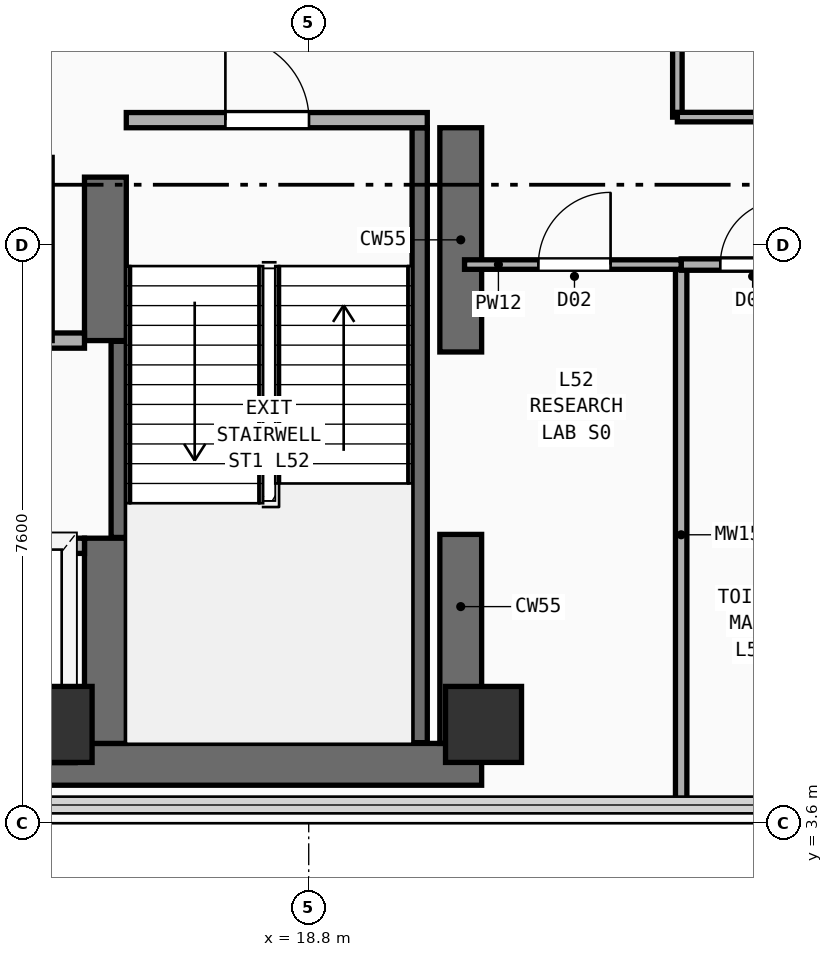
"""IFC4 building model, lengths in metres.
Left out: names, types, materials, properties, quantities, classifications, styles, units other than length and angle.
Written with IfcOpenShell. Run it as: python <this file> out.ifc"""

import sys

from ifc_helpers import new_model, si_unit, direction, frame, frame_2d, origin, origin_2d, place, context, subcontext, project, spatial, rectangle, extrude, element, fill, save


model = new_model("IFC4")
c1 = context("Model", 3, precision=1e-05, world=origin(), true_north=direction((0.0, 1.0)))
c2 = subcontext(c1, "Body", "Model", "MODEL_VIEW")
j1 = project(units=[si_unit("LENGTHUNIT", "METRE"), si_unit("PLANEANGLEUNIT", "RADIAN")], contexts=[c1])
p1 = place(None, origin())
s1 = spatial("IfcSite", under=j1, at=p1, CompositionType="ELEMENT")
p2 = place(p1, origin())
s2 = spatial("IfcBuilding", under=s1, at=p2, CompositionType="ELEMENT")
p3 = place(p2, frame((0.0, 0.0, 204.5)))
s3 = spatial("IfcBuildingStorey", under=s2, at=p3, CompositionType="ELEMENT", Elevation=204.5)
p4 = place(p3, frame((7.175, 4.375, 0.0), z_axis=(0.0, 0.0, 1.0), x_axis=(1.0, 0.0, 0.0)))
e1 = element("IfcWall", 1, at=p4, inside=s3, PredefinedType="SHEAR", context=c2, shape_type="SweptSolid", body=[
    extrude(rectangle(XDim=13.9, YDim=0.55, at=frame_2d((6.95, 0.0))), origin(), (0.0, 0.0, 1.0), 3.56),
])
p5 = place(p3, frame((20.8, 4.65, 0.0), z_axis=(0.0, 0.0, 1.0), x_axis=(0.0, 1.0, 0.0)))
e2 = element("IfcWall", 2, at=p5, inside=s3, PredefinedType="SHEAR", context=c2, shape_type="SweptSolid", body=[
    extrude(rectangle(XDim=2.75, YDim=0.55, at=frame_2d((1.375, 0.0))), origin(), (0.0, 0.0, 1.0), 3.56),
])
p6 = place(p3, frame((20.8, 9.8, 0.0), z_axis=(0.0, 0.0, 1.0), x_axis=(0.0, 1.0, 0.0)))
e3 = element("IfcWall", 3, at=p6, inside=s3, PredefinedType="SHEAR", context=c2, shape_type="SweptSolid", body=[
    extrude(rectangle(XDim=2.95, YDim=0.55, at=frame_2d((1.475, 0.0))), origin(), (0.0, 0.0, 1.0), 3.56),
])
p7 = place(p3, frame((16.125, 4.65, 0.0), z_axis=(0.0, 0.0, 1.0), x_axis=(0.0, 1.0, 0.0)))
e4 = element("IfcWall", 4, at=p7, inside=s3, PredefinedType="SHEAR", context=c2, shape_type="SweptSolid", body=[
    extrude(rectangle(XDim=2.7, YDim=0.55, at=frame_2d((1.35, 0.0))), origin(), (0.0, 0.0, 1.0), 3.56),
])
p8 = place(p3, frame((16.125, 9.95, 0.0), z_axis=(0.0, 0.0, 1.0), x_axis=(0.0, 1.0, 0.0)))
e5 = element("IfcWall", 5, at=p8, inside=s3, PredefinedType="SHEAR", context=c2, shape_type="SweptSolid", body=[
    extrude(rectangle(XDim=2.15, YDim=0.55, at=frame_2d((1.075, 0.0))), origin(), (0.0, 0.0, 1.0), 3.56),
])
for number, where, z_axis, x_axis in (
    (6, (15.45, 4.9, 0.0), (0.0, 0.0, 1.0), (1.0, 0.0, 0.0)),
    (7, (21.1, 4.9, 0.0), (0.0, 0.0, 1.0), (1.0, 0.0, 0.0)),
):
    element("IfcColumn", number, at=place(p3, frame(where, z_axis=z_axis, x_axis=x_axis)), inside=s3, PredefinedType="COLUMN", context=c2, shape_type="SweptSolid", body=[
        extrude(rectangle(XDim=1.0, YDim=1.0, at=origin_2d()), origin(), (0.0, 0.0, 1.0), 3.56),
    ])
p9 = place(p3, frame((16.3, 7.36, 0.0), z_axis=(0.0, 0.0, 1.0), x_axis=(0.0, 1.0, 0.0)))
e8 = element("IfcWall", 8, at=p9, inside=s3, PredefinedType="SHEAR", context=c2, shape_type="SweptSolid", body=[
    extrude(rectangle(XDim=2.58, YDim=0.2, at=frame_2d((1.29, 0.0))), origin(), (0.0, 0.0, 1.0), 3.56),
])
p10 = place(p3, frame((20.26, 4.66, 0.0), z_axis=(0.0, 0.0, 1.0), x_axis=(0.0, 1.0, 0.0)))
e9 = element("IfcWall", 9, at=p10, inside=s3, PredefinedType="SHEAR", context=c2, shape_type="SweptSolid", body=[
    extrude(rectangle(XDim=8.09, YDim=0.2, at=frame_2d((4.045, 0.0))), origin(), (0.0, 0.0, 1.0), 3.56),
])
p11 = place(p3, frame((16.4, 12.85, 0.0), z_axis=(0.0, 0.0, 1.0), x_axis=(1.0, 0.0, 0.0)))
e10 = element("IfcWall", 10, at=p11, inside=s3, PredefinedType="PARTITIONING", context=c2, shape_type="SweptSolid", body=[
    extrude(rectangle(XDim=3.96, YDim=0.2, at=frame_2d((1.98, 0.0))), origin(), (0.0, 0.0, 1.0), 3.56),
])
p12 = place(p11, frame((1.304, 0.0, 0.0)))
e11 = element("IfcOpeningElement", 11, at=p12, cuts=e10, PredefinedType="OPENING", context=c2, shape_type="SweptSolid", body=[
    extrude(rectangle(XDim=1.1, YDim=2.2, at=frame_2d((0.55, 1.1))), frame((0.0, 0.11, 0.0), z_axis=(0.0, -1.0, 0.0), x_axis=(1.0, 0.0, 0.0)), (0.0, 0.0, 1.0), 0.22),
])
p13 = place(p3, frame((7.5, 7.25, 0.0), z_axis=(0.0, 0.0, 1.0), x_axis=(1.0, 0.0, 0.0)))
e12 = element("IfcWall", 12, at=p13, inside=s3, PredefinedType="PARTITIONING", context=c2, shape_type="SweptSolid", body=[
    extrude(rectangle(XDim=8.35, YDim=0.2, at=frame_2d((4.175, 0.0))), origin(), (0.0, 0.0, 1.0), 3.56),
])
p14 = place(p13, frame((0.53, 0.0, 0.0)))
e13 = element("IfcOpeningElement", 13, at=p14, cuts=e12, PredefinedType="OPENING", context=c2, shape_type="SweptSolid", body=[
    extrude(rectangle(XDim=1.1, YDim=2.2, at=frame_2d((0.55, 1.1))), frame((0.0, 0.11, 0.0), z_axis=(0.0, -1.0, 0.0), x_axis=(1.0, 0.0, 0.0)), (0.0, 0.0, 1.0), 0.22),
])
p15 = place(p13, frame((2.37, 0.0, 0.0)))
e14 = element("IfcOpeningElement", 14, at=p15, cuts=e12, PredefinedType="OPENING", context=c2, shape_type="SweptSolid", body=[
    extrude(rectangle(XDim=1.1, YDim=2.2, at=frame_2d((0.55, 1.1))), frame((0.0, 0.11, 0.0), z_axis=(0.0, -1.0, 0.0), x_axis=(1.0, 0.0, 0.0)), (0.0, 0.0, 1.0), 0.22),
])
p16 = place(p13, frame((4.33, 0.0, 0.0)))
e15 = element("IfcOpeningElement", 15, at=p16, cuts=e12, PredefinedType="OPENING", context=c2, shape_type="SweptSolid", body=[
    extrude(rectangle(XDim=1.1, YDim=2.2, at=frame_2d((0.55, 1.1))), frame((0.0, 0.11, 0.0), z_axis=(0.0, -1.0, 0.0), x_axis=(1.0, 0.0, 0.0)), (0.0, 0.0, 1.0), 0.22),
])
p17 = place(p13, frame((6.5, 0.0, 0.0)))
e16 = element("IfcOpeningElement", 16, at=p17, cuts=e12, PredefinedType="OPENING", context=c2, shape_type="SweptSolid", body=[
    extrude(rectangle(XDim=1.1, YDim=2.2, at=frame_2d((0.55, 1.1))), frame((0.0, 0.11, 0.0), z_axis=(0.0, -1.0, 0.0), x_axis=(1.0, 0.0, 0.0)), (0.0, 0.0, 1.0), 0.22),
])
p18 = place(p3, frame((7.5, 9.95, 0.0), z_axis=(0.0, 0.0, 1.0), x_axis=(1.0, 0.0, 0.0)))
e17 = element("IfcWall", 17, at=p18, inside=s3, PredefinedType="PARTITIONING", context=c2, shape_type="SweptSolid", body=[
    extrude(rectangle(XDim=8.35, YDim=0.2, at=frame_2d((4.175, 0.0))), origin(), (0.0, 0.0, 1.0), 3.56),
])
p19 = place(p3, frame((15.35, 9.95, 0.0), z_axis=(0.0, 0.0, 1.0), x_axis=(0.0, 1.0, 0.0)))
e18 = element("IfcWall", 18, at=p19, inside=s3, PredefinedType="PARTITIONING", context=c2, shape_type="SweptSolid", body=[
    extrude(rectangle(XDim=2.41, YDim=0.15, at=frame_2d((1.205, 0.0))), origin(), (0.0, 0.0, 1.0), 3.56),
])
p20 = place(p3, frame((23.7, 3.84, 0.0), z_axis=(0.0, 0.0, 1.0), x_axis=(0.0, 1.0, 0.0)))
e19 = element("IfcWall", 19, at=p20, inside=s3, PredefinedType="PLUMBINGWALL", context=c2, shape_type="SweptSolid", body=[
    extrude(rectangle(XDim=7.11, YDim=0.15, at=frame_2d((3.555, 0.0))), origin(), (0.0, 0.0, 1.0), 3.56),
])
p21 = place(p3, frame((23.7, 10.95, 0.0), z_axis=(0.0, 0.0, 1.0), x_axis=(1.0, 0.0, 0.0)))
e20 = element("IfcWall", 20, at=p21, inside=s3, PredefinedType="PLUMBINGWALL", context=c2, shape_type="SweptSolid", body=[
    extrude(rectangle(XDim=5.7, YDim=0.15, at=frame_2d((2.85, 0.0))), origin(), (0.0, 0.0, 1.0), 3.56),
])
p22 = place(p21, frame((0.515, 0.0, 0.0)))
e21 = element("IfcOpeningElement", 21, at=p22, cuts=e20, PredefinedType="OPENING", context=c2, shape_type="SweptSolid", body=[
    extrude(rectangle(XDim=0.85, YDim=2.15, at=frame_2d((0.425, 1.075))), frame((0.0, 0.085, 0.0), z_axis=(0.0, -1.0, 0.0), x_axis=(1.0, 0.0, 0.0)), (0.0, 0.0, 1.0), 0.17),
])
p23 = place(p21, frame((2.395, 0.0, 0.0)))
e22 = element("IfcOpeningElement", 22, at=p23, cuts=e20, PredefinedType="OPENING", context=c2, shape_type="SweptSolid", body=[
    extrude(rectangle(XDim=0.85, YDim=2.15, at=frame_2d((0.425, 1.075))), frame((0.0, 0.085, 0.0), z_axis=(0.0, -1.0, 0.0), x_axis=(1.0, 0.0, 0.0)), (0.0, 0.0, 1.0), 0.17),
])
p24 = place(p21, frame((4.35, 0.0, 0.0)))
e23 = element("IfcOpeningElement", 23, at=p24, cuts=e20, PredefinedType="OPENING", context=c2, shape_type="SweptSolid", body=[
    extrude(rectangle(XDim=1.0, YDim=2.2, at=frame_2d((0.5, 1.1))), frame((0.0, 0.085, 0.0), z_axis=(0.0, -1.0, 0.0), x_axis=(1.0, 0.0, 0.0)), (0.0, 0.0, 1.0), 0.17),
])
p25 = place(p3, frame((20.85, 10.95, 0.0), z_axis=(0.0, 0.0, 1.0), x_axis=(1.0, 0.0, 0.0)))
e24 = element("IfcWall", 24, at=p25, inside=s3, PredefinedType="PARTITIONING", context=c2, shape_type="SweptSolid", body=[
    extrude(rectangle(XDim=2.85, YDim=0.125, at=frame_2d((1.425, 0.0))), origin(), (0.0, 0.0, 1.0), 3.56),
])
p26 = place(p25, frame((0.971, 0.0, 0.0)))
e25 = element("IfcOpeningElement", 25, at=p26, cuts=e24, PredefinedType="OPENING", context=c2, shape_type="SweptSolid", body=[
    extrude(rectangle(XDim=0.95, YDim=2.15, at=frame_2d((0.475, 1.075))), frame((0.0, 0.073, 0.0), z_axis=(0.0, -1.0, 0.0), x_axis=(1.0, 0.0, 0.0)), (0.0, 0.0, 1.0), 0.145),
])
p27 = place(p3, frame((23.65, 12.89, 0.0), z_axis=(0.0, 0.0, 1.0), x_axis=(0.0, 1.0, 0.0)))
e26 = element("IfcWall", 26, at=p27, inside=s3, PredefinedType="PARTITIONING", context=c2, shape_type="SweptSolid", body=[
    extrude(rectangle(XDim=11.02, YDim=0.125, at=frame_2d((5.51, 0.0))), origin(), (0.0, 0.0, 1.0), 3.56),
])
p28 = place(p3, frame((23.65, 12.89, 0.0), z_axis=(0.0, 0.0, 1.0), x_axis=(1.0, 0.0, 0.0)))
e27 = element("IfcWall", 27, at=p28, inside=s3, PredefinedType="PARTITIONING", context=c2, shape_type="SweptSolid", body=[
    extrude(rectangle(XDim=10.55, YDim=0.125, at=frame_2d((5.275, 0.0))), origin(), (0.0, 0.0, 1.0), 3.56),
])
p29 = place(p28, frame((1.95, 0.0, 0.0)))
e28 = element("IfcOpeningElement", 28, at=p29, cuts=e27, PredefinedType="OPENING", context=c2, shape_type="SweptSolid", body=[
    extrude(rectangle(XDim=0.95, YDim=2.15, at=frame_2d((0.475, 1.075))), frame((0.0, 0.073, 0.0), z_axis=(0.0, -1.0, 0.0), x_axis=(1.0, 0.0, 0.0)), (0.0, 0.0, 1.0), 0.145),
])
p30 = place(p28, frame((7.225, 0.0, 0.0)))
e29 = element("IfcOpeningElement", 29, at=p30, cuts=e27, PredefinedType="OPENING", context=c2, shape_type="SweptSolid", body=[
    extrude(rectangle(XDim=0.95, YDim=2.15, at=frame_2d((0.475, 1.075))), frame((0.0, 0.073, 0.0), z_axis=(0.0, -1.0, 0.0), x_axis=(1.0, 0.0, 0.0)), (0.0, 0.0, 1.0), 0.145),
])
p31 = place(p12, frame((1.1, 0.0, 0.0), z_axis=(0.0, 0.0, 1.0), x_axis=(-1.0, 0.0, 0.0)))
e30 = element("IfcDoor", 30, at=p31, inside=s3, OperationType="SINGLE_SWING_RIGHT", PredefinedType="DOOR", context=c2, shape_type="SweptSolid", body=[
    extrude(rectangle(XDim=1.1, YDim=2.2, at=frame_2d((0.55, 1.1))), frame((0.0, 0.025, 0.0), z_axis=(0.0, -1.0, 0.0), x_axis=(1.0, 0.0, 0.0)), (0.0, 0.0, 1.0), 0.05),
])
fill(e11, e30)
p32 = place(p22, origin())
e31 = element("IfcDoor", 31, at=p32, inside=s3, OperationType="SINGLE_SWING_RIGHT", PredefinedType="DOOR", context=c2, shape_type="SweptSolid", body=[
    extrude(rectangle(XDim=0.85, YDim=2.15, at=frame_2d((0.425, 1.075))), frame((0.0, 0.025, 0.0), z_axis=(0.0, -1.0, 0.0), x_axis=(1.0, 0.0, 0.0)), (0.0, 0.0, 1.0), 0.05),
])
fill(e21, e31)
p33 = place(p26, origin())
e32 = element("IfcDoor", 32, at=p33, inside=s3, OperationType="SINGLE_SWING_RIGHT", PredefinedType="DOOR", context=c2, shape_type="SweptSolid", body=[
    extrude(rectangle(XDim=0.95, YDim=2.15, at=frame_2d((0.475, 1.075))), frame((0.0, 0.025, 0.0), z_axis=(0.0, -1.0, 0.0), x_axis=(1.0, 0.0, 0.0)), (0.0, 0.0, 1.0), 0.05),
])
fill(e25, e32)
save(model, sys.argv[1])
